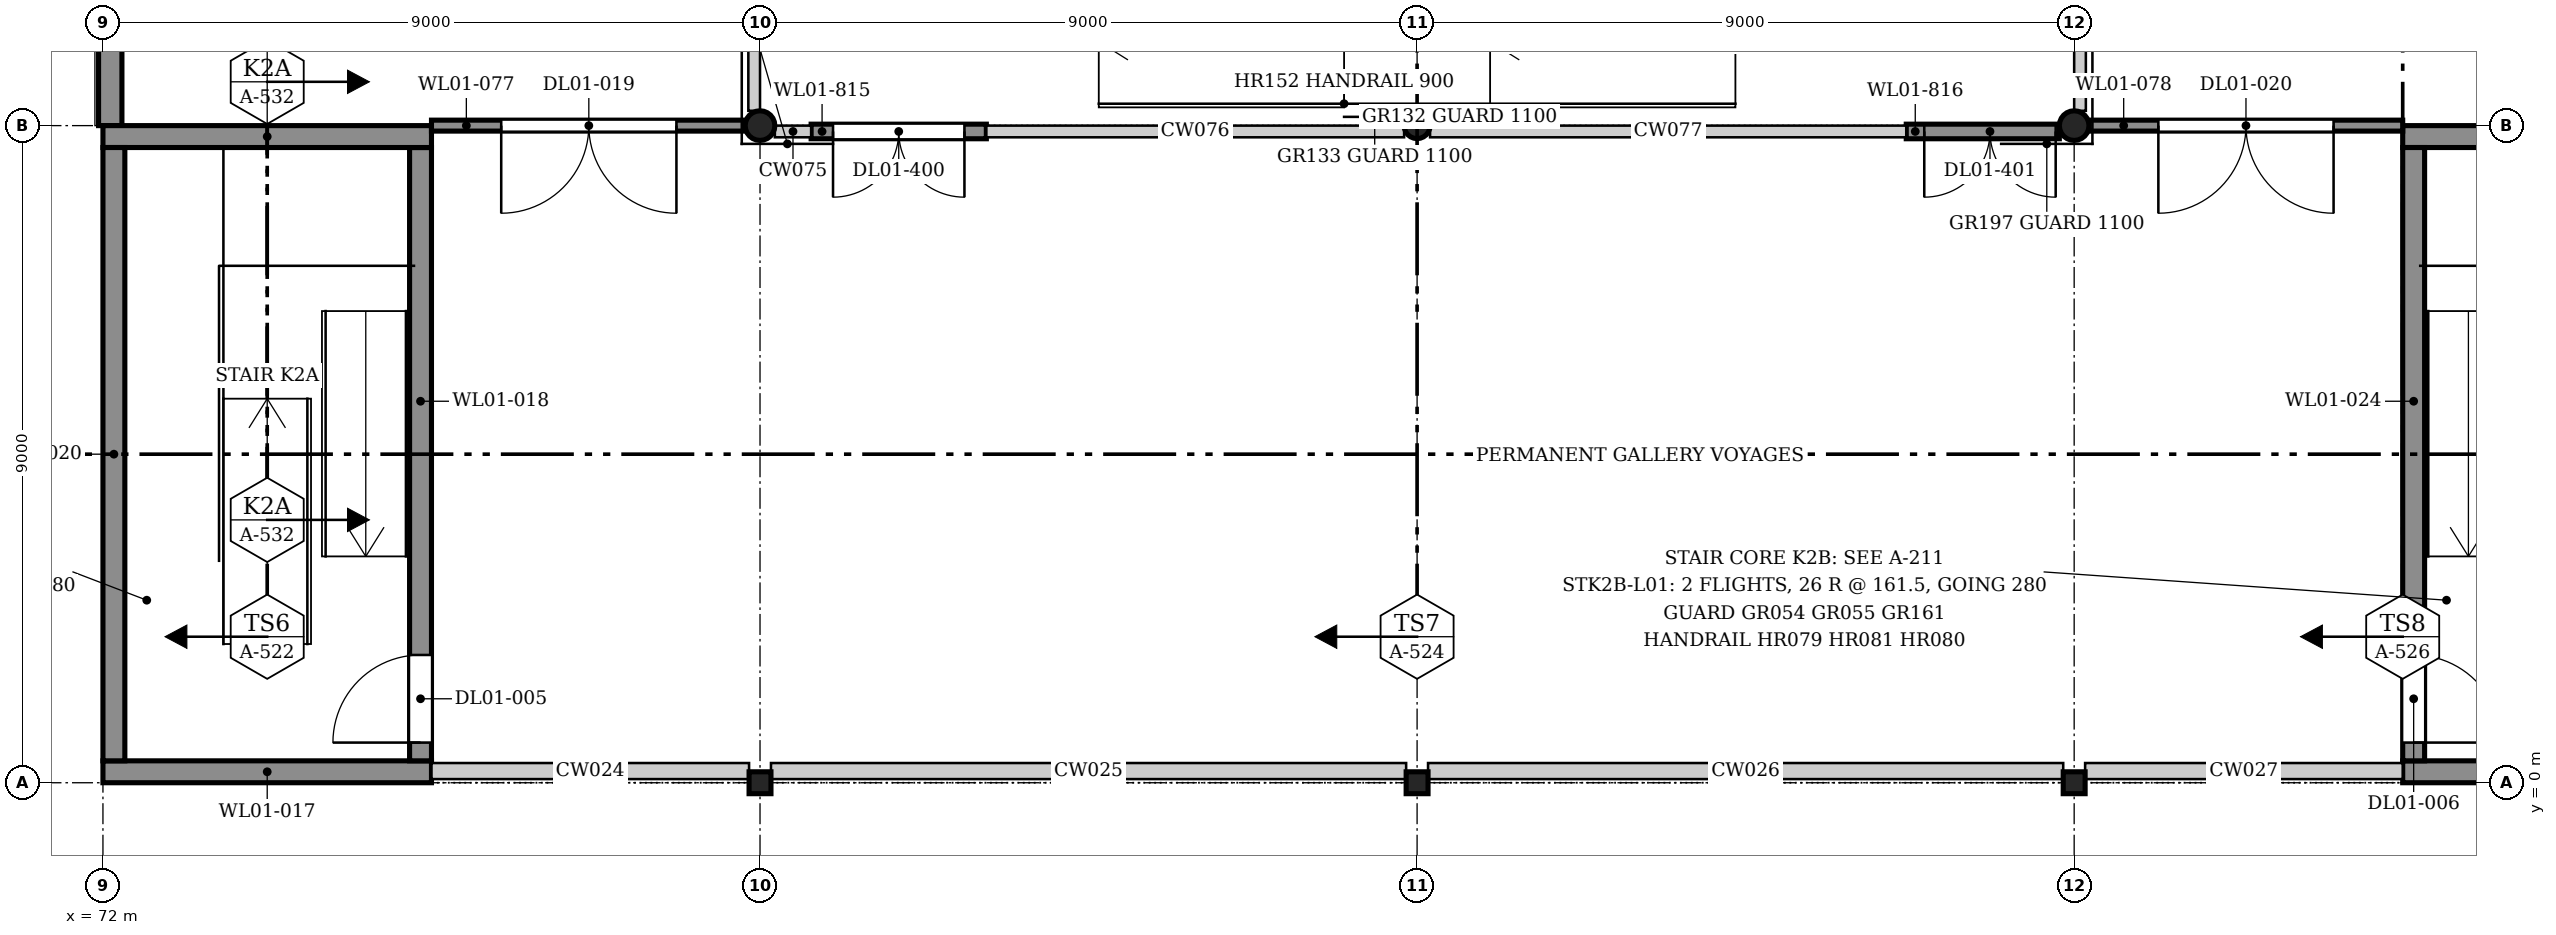
"""IFC4 building model, lengths in metres.
Left out: names, types, materials, properties, quantities, classifications, styles, units other than length and angle.
Written with IfcOpenShell. Run it as: python <this file> out.ifc"""

import sys

from ifc_helpers import new_model, si_unit, direction, frame, frame_2d, origin, origin_2d, place, context, subcontext, project, spatial, rectangle, hollow_rectangle, hollow_circle, extrude, element, fill, save


model = new_model("IFC4")
c1 = context("Model", 3, precision=1e-05, world=origin(), true_north=direction((0.0, 1.0)))
c2 = subcontext(c1, "Body", "Model", "MODEL_VIEW")
j1 = project(units=[si_unit("LENGTHUNIT", "METRE"), si_unit("PLANEANGLEUNIT", "RADIAN")], contexts=[c1])
p1 = place(None, origin())
s1 = spatial("IfcSite", under=j1, at=p1, CompositionType="ELEMENT")
p2 = place(p1, origin())
s2 = spatial("IfcBuilding", under=s1, at=p2, CompositionType="ELEMENT")
p3 = place(p2, frame((0.0, 0.0, 5.0)))
s3 = spatial("IfcBuildingStorey", under=s2, at=p3, CompositionType="ELEMENT", Elevation=5.0)
p4 = place(p3, frame((81.0, 0.0, 0.0), z_axis=(0.0, 0.0, 1.0), x_axis=(1.0, 0.0, 0.0)))
e1 = element("IfcColumn", 1, at=p4, inside=s3, PredefinedType="COLUMN", context=c2, shape_type="SweptSolid", body=[
    extrude(hollow_rectangle(XDim=0.3, YDim=0.3, WallThickness=0.016, InnerFilletRadius=0.024, OuterFilletRadius=0.04, at=origin_2d()), origin(), (0.0, 0.0, 1.0), 4.2),
])
p5 = place(p3, frame((90.0, 0.0, 0.0), z_axis=(0.0, 0.0, 1.0), x_axis=(1.0, 0.0, 0.0)))
e2 = element("IfcColumn", 2, at=p5, inside=s3, PredefinedType="COLUMN", context=c2, shape_type="SweptSolid", body=[
    extrude(hollow_rectangle(XDim=0.3, YDim=0.3, WallThickness=0.01, InnerFilletRadius=0.015, OuterFilletRadius=0.025, at=origin_2d()), origin(), (0.0, 0.0, 1.0), 4.2),
])
p6 = place(p3, frame((99.0, 0.0, 0.0), z_axis=(0.0, 0.0, 1.0), x_axis=(1.0, 0.0, 0.0)))
e3 = element("IfcColumn", 3, at=p6, inside=s3, PredefinedType="COLUMN", context=c2, shape_type="SweptSolid", body=[
    extrude(hollow_rectangle(XDim=0.3, YDim=0.3, WallThickness=0.016, InnerFilletRadius=0.024, OuterFilletRadius=0.04, at=origin_2d()), origin(), (0.0, 0.0, 1.0), 4.2),
])
p7 = place(p3, frame((81.0, 9.0, 0.0), z_axis=(0.0, 0.0, 1.0), x_axis=(1.0, 0.0, 0.0)))
e4 = element("IfcColumn", 4, at=p7, inside=s3, PredefinedType="COLUMN", context=c2, shape_type="SweptSolid", body=[
    extrude(hollow_circle(Radius=0.203, WallThickness=0.013, at=origin_2d()), origin(), (0.0, 0.0, 1.0), 4.2),
])
p8 = place(p3, frame((90.0, 9.0, 0.0), z_axis=(0.0, 0.0, 1.0), x_axis=(1.0, 0.0, 0.0)))
e5 = element("IfcColumn", 5, at=p8, inside=s3, PredefinedType="COLUMN", context=c2, shape_type="SweptSolid", body=[
    extrude(hollow_circle(Radius=0.178, WallThickness=0.013, at=origin_2d()), origin(), (0.0, 0.0, 1.0), 4.2),
])
p9 = place(p3, frame((99.0, 9.0, 0.0), z_axis=(0.0, 0.0, 1.0), x_axis=(1.0, 0.0, 0.0)))
e6 = element("IfcColumn", 6, at=p9, inside=s3, PredefinedType="COLUMN", context=c2, shape_type="SweptSolid", body=[
    extrude(hollow_circle(Radius=0.203, WallThickness=0.013, at=origin_2d()), origin(), (0.0, 0.0, 1.0), 4.2),
])
p10 = place(p3, frame((72.1, 9.0, 0.0), z_axis=(0.0, 0.0, 1.0), x_axis=(0.0, 1.0, 0.0)))
e7 = element("IfcWall", 7, at=p10, inside=s3, PredefinedType="SOLIDWALL", context=c2, shape_type="SweptSolid", body=[
    extrude(rectangle(XDim=9.0, YDim=0.32, at=frame_2d((4.5, 0.0))), origin(), (0.0, 0.0, 1.0), 4.035),
])
p11 = place(p3, frame((81.7, 8.92, 0.0), z_axis=(0.0, 0.0, 1.0), x_axis=(1.0, 0.0, 0.0)))
e8 = element("IfcWall", 8, at=p11, inside=s3, PredefinedType="SOLIDWALL", context=c2, shape_type="SweptSolid", body=[
    extrude(rectangle(XDim=2.4, YDim=0.2, at=frame_2d((1.2, 0.0))), origin(), (0.0, 0.0, 1.0), 3.125),
])
p12 = place(p11, frame((0.3, 0.0, 0.0)))
e9 = element("IfcOpeningElement", 9, at=p12, cuts=e8, PredefinedType="OPENING", context=c2, shape_type="SweptSolid", body=[
    extrude(rectangle(XDim=1.8, YDim=2.4, at=frame_2d((0.9, 1.2))), frame((0.0, 0.11, 0.0), z_axis=(0.0, -1.0, 0.0), x_axis=(1.0, 0.0, 0.0)), (0.0, 0.0, 1.0), 0.22),
])
p13 = place(p3, frame((96.7, 8.92, 0.0), z_axis=(0.0, 0.0, 1.0), x_axis=(1.0, 0.0, 0.0)))
e10 = element("IfcWall", 10, at=p13, inside=s3, PredefinedType="SOLIDWALL", context=c2, shape_type="SweptSolid", body=[
    extrude(rectangle(XDim=2.097, YDim=0.2, at=frame_2d((1.048, 0.0))), origin(), (0.0, 0.0, 1.0), 3.125),
])
p14 = place(p13, frame((0.247, 0.0, 0.0)))
e11 = element("IfcOpeningElement", 11, at=p14, cuts=e10, PredefinedType="OPENING", context=c2, shape_type="SweptSolid", body=[
    extrude(rectangle(XDim=1.8, YDim=2.4, at=frame_2d((0.9, 1.2))), frame((0.0, 0.11, 0.0), z_axis=(0.0, -1.0, 0.0), x_axis=(1.0, 0.0, 0.0)), (0.0, 0.0, 1.0), 0.22),
])
p15 = place(p3, frame((72.0, 0.15, 0.0), z_axis=(0.0, 0.0, 1.0), x_axis=(1.0, 0.0, 0.0)))
e12 = element("IfcWall", 12, at=p15, inside=s3, PredefinedType="SOLIDWALL", context=c2, shape_type="SweptSolid", body=[
    extrude(rectangle(XDim=4.5, YDim=0.3, at=frame_2d((2.25, 0.0))), origin(), (0.0, 0.0, 1.0), 4.2),
])
p16 = place(p3, frame((76.35, 0.3, 0.0), z_axis=(0.0, 0.0, 1.0), x_axis=(0.0, 1.0, 0.0)))
e13 = element("IfcWall", 13, at=p16, inside=s3, PredefinedType="SOLIDWALL", context=c2, shape_type="SweptSolid", body=[
    extrude(rectangle(XDim=8.4, YDim=0.3, at=frame_2d((4.2, 0.0))), origin(), (0.0, 0.0, 1.0), 4.2),
])
p17 = place(p16, frame((0.25, 0.0, 0.0)))
e14 = element("IfcOpeningElement", 14, at=p17, cuts=e13, PredefinedType="OPENING", context=c2, shape_type="SweptSolid", body=[
    extrude(rectangle(XDim=1.2, YDim=2.1, at=frame_2d((0.6, 1.05))), frame((0.0, 0.16, 0.0), z_axis=(0.0, -1.0, 0.0), x_axis=(1.0, 0.0, 0.0)), (0.0, 0.0, 1.0), 0.32),
])
p18 = place(p3, frame((72.0, 8.85, 0.0), z_axis=(0.0, 0.0, 1.0), x_axis=(1.0, 0.0, 0.0)))
e15 = element("IfcWall", 15, at=p18, inside=s3, PredefinedType="SOLIDWALL", context=c2, shape_type="SweptSolid", body=[
    extrude(rectangle(XDim=4.5, YDim=0.3, at=frame_2d((2.25, 0.0))), origin(), (0.0, 0.0, 1.0), 4.2),
])
p19 = place(p3, frame((72.15, 0.3, 0.0), z_axis=(0.0, 0.0, 1.0), x_axis=(0.0, 1.0, 0.0)))
e16 = element("IfcWall", 16, at=p19, inside=s3, PredefinedType="SOLIDWALL", context=c2, shape_type="SweptSolid", body=[
    extrude(rectangle(XDim=8.4, YDim=0.3, at=frame_2d((4.2, 0.0))), origin(), (0.0, 0.0, 1.0), 4.2),
])
for number, where, z_axis, x_axis in (
    (17, (103.5, 0.15, 0.0), (0.0, 0.0, 1.0), (1.0, 0.0, 0.0)),
    (18, (103.5, 8.85, 0.0), (0.0, 0.0, 1.0), (1.0, 0.0, 0.0)),
):
    element("IfcWall", number, at=place(p3, frame(where, z_axis=z_axis, x_axis=x_axis)), inside=s3, PredefinedType="SOLIDWALL", context=c2, shape_type="SweptSolid", body=[
        extrude(rectangle(XDim=4.5, YDim=0.3, at=frame_2d((2.25, 0.0))), origin(), (0.0, 0.0, 1.0), 4.2),
    ])
p20 = place(p3, frame((103.65, 0.3, 0.0), z_axis=(0.0, 0.0, 1.0), x_axis=(0.0, 1.0, 0.0)))
e19 = element("IfcWall", 19, at=p20, inside=s3, PredefinedType="SOLIDWALL", context=c2, shape_type="SweptSolid", body=[
    extrude(rectangle(XDim=8.4, YDim=0.3, at=frame_2d((4.2, 0.0))), origin(), (0.0, 0.0, 1.0), 4.2),
])
p21 = place(p20, frame((0.25, 0.0, 0.0)))
e20 = element("IfcOpeningElement", 20, at=p21, cuts=e19, PredefinedType="OPENING", context=c2, shape_type="SweptSolid", body=[
    extrude(rectangle(XDim=1.2, YDim=2.1, at=frame_2d((0.6, 1.05))), frame((0.0, 0.16, 0.0), z_axis=(0.0, -1.0, 0.0), x_axis=(1.0, 0.0, 0.0)), (0.0, 0.0, 1.0), 0.32),
])
p22 = place(p3, frame((76.5, 9.0, 0.0), z_axis=(0.0, 0.0, 1.0), x_axis=(1.0, 0.0, 0.0)))
e21 = element("IfcWall", 21, at=p22, inside=s3, PredefinedType="PARTITIONING", context=c2, shape_type="SweptSolid", body=[
    extrude(rectangle(XDim=4.297, YDim=0.15, at=frame_2d((2.148, 0.0))), origin(), (0.0, 0.0, 1.0), 3.502),
])
p23 = place(p22, frame((0.955, 0.0, 0.0)))
e22 = element("IfcOpeningElement", 22, at=p23, cuts=e21, PredefinedType="OPENING", context=c2, shape_type="SweptSolid", body=[
    extrude(rectangle(XDim=2.4, YDim=2.4, at=frame_2d((1.2, 1.2))), frame((0.0, 0.085, 0.0), z_axis=(0.0, -1.0, 0.0), x_axis=(1.0, 0.0, 0.0)), (0.0, 0.0, 1.0), 0.17),
])
p24 = place(p3, frame((99.203, 9.0, 0.0), z_axis=(0.0, 0.0, 1.0), x_axis=(1.0, 0.0, 0.0)))
e23 = element("IfcWall", 23, at=p24, inside=s3, PredefinedType="PARTITIONING", context=c2, shape_type="SweptSolid", body=[
    extrude(rectangle(XDim=4.297, YDim=0.15, at=frame_2d((2.148, 0.0))), origin(), (0.0, 0.0, 1.0), 3.502),
])
p25 = place(p24, frame((0.95, 0.0, 0.0)))
e24 = element("IfcOpeningElement", 24, at=p25, cuts=e23, PredefinedType="OPENING", context=c2, shape_type="SweptSolid", body=[
    extrude(rectangle(XDim=2.4, YDim=2.4, at=frame_2d((1.2, 1.2))), frame((0.0, 0.085, 0.0), z_axis=(0.0, -1.0, 0.0), x_axis=(1.0, 0.0, 0.0)), (0.0, 0.0, 1.0), 0.17),
])
p26 = place(p12, frame((1.8, 0.0, 0.0), z_axis=(0.0, 0.0, 1.0), x_axis=(-1.0, 0.0, 0.0)))
e25 = element("IfcDoor", 25, at=p26, inside=s3, OperationType="DOUBLE_DOOR_SINGLE_SWING", PredefinedType="DOOR", context=c2, shape_type="SweptSolid", body=[
    extrude(rectangle(XDim=1.8, YDim=2.4, at=frame_2d((0.9, 1.2))), frame((0.0, 0.025, 0.0), z_axis=(0.0, -1.0, 0.0), x_axis=(1.0, 0.0, 0.0)), (0.0, 0.0, 1.0), 0.05),
])
fill(e9, e25)
p27 = place(p14, frame((1.8, 0.0, 0.0), z_axis=(0.0, 0.0, 1.0), x_axis=(-1.0, 0.0, 0.0)))
e26 = element("IfcDoor", 26, at=p27, inside=s3, OperationType="DOUBLE_DOOR_SINGLE_SWING", PredefinedType="DOOR", context=c2, shape_type="SweptSolid", body=[
    extrude(rectangle(XDim=1.8, YDim=2.4, at=frame_2d((0.9, 1.2))), frame((0.0, 0.025, 0.0), z_axis=(0.0, -1.0, 0.0), x_axis=(1.0, 0.0, 0.0)), (0.0, 0.0, 1.0), 0.05),
])
fill(e11, e26)
p28 = place(p17, origin())
e27 = element("IfcDoor", 27, at=p28, inside=s3, OperationType="SINGLE_SWING_RIGHT", PredefinedType="DOOR", context=c2, shape_type="SweptSolid", body=[
    extrude(rectangle(XDim=1.2, YDim=2.1, at=frame_2d((0.6, 1.05))), frame((0.0, 0.025, 0.0), z_axis=(0.0, -1.0, 0.0), x_axis=(1.0, 0.0, 0.0)), (0.0, 0.0, 1.0), 0.05),
])
fill(e14, e27)
p29 = place(p21, frame((1.2, 0.0, 0.0), z_axis=(0.0, 0.0, 1.0), x_axis=(-1.0, 0.0, 0.0)))
e28 = element("IfcDoor", 28, at=p29, inside=s3, OperationType="SINGLE_SWING_LEFT", PredefinedType="DOOR", context=c2, shape_type="SweptSolid", body=[
    extrude(rectangle(XDim=1.2, YDim=2.1, at=frame_2d((0.6, 1.05))), frame((0.0, 0.025, 0.0), z_axis=(0.0, -1.0, 0.0), x_axis=(1.0, 0.0, 0.0)), (0.0, 0.0, 1.0), 0.05),
])
fill(e20, e28)
p30 = place(p23, frame((2.4, 0.0, 0.0), z_axis=(0.0, 0.0, 1.0), x_axis=(-1.0, 0.0, 0.0)))
e29 = element("IfcDoor", 29, at=p30, inside=s3, OperationType="DOUBLE_DOOR_SINGLE_SWING", PredefinedType="DOOR", context=c2, shape_type="SweptSolid", body=[
    extrude(rectangle(XDim=2.4, YDim=2.4, at=frame_2d((1.2, 1.2))), frame((0.0, 0.025, 0.0), z_axis=(0.0, -1.0, 0.0), x_axis=(1.0, 0.0, 0.0)), (0.0, 0.0, 1.0), 0.05),
])
fill(e22, e29)
p31 = place(p25, frame((2.4, 0.0, 0.0), z_axis=(0.0, 0.0, 1.0), x_axis=(-1.0, 0.0, 0.0)))
e30 = element("IfcDoor", 30, at=p31, inside=s3, OperationType="DOUBLE_DOOR_SINGLE_SWING", PredefinedType="DOOR", context=c2, shape_type="SweptSolid", body=[
    extrude(rectangle(XDim=2.4, YDim=2.4, at=frame_2d((1.2, 1.2))), frame((0.0, 0.025, 0.0), z_axis=(0.0, -1.0, 0.0), x_axis=(1.0, 0.0, 0.0)), (0.0, 0.0, 1.0), 0.05),
])
fill(e24, e30)
save(model, sys.argv[1])
